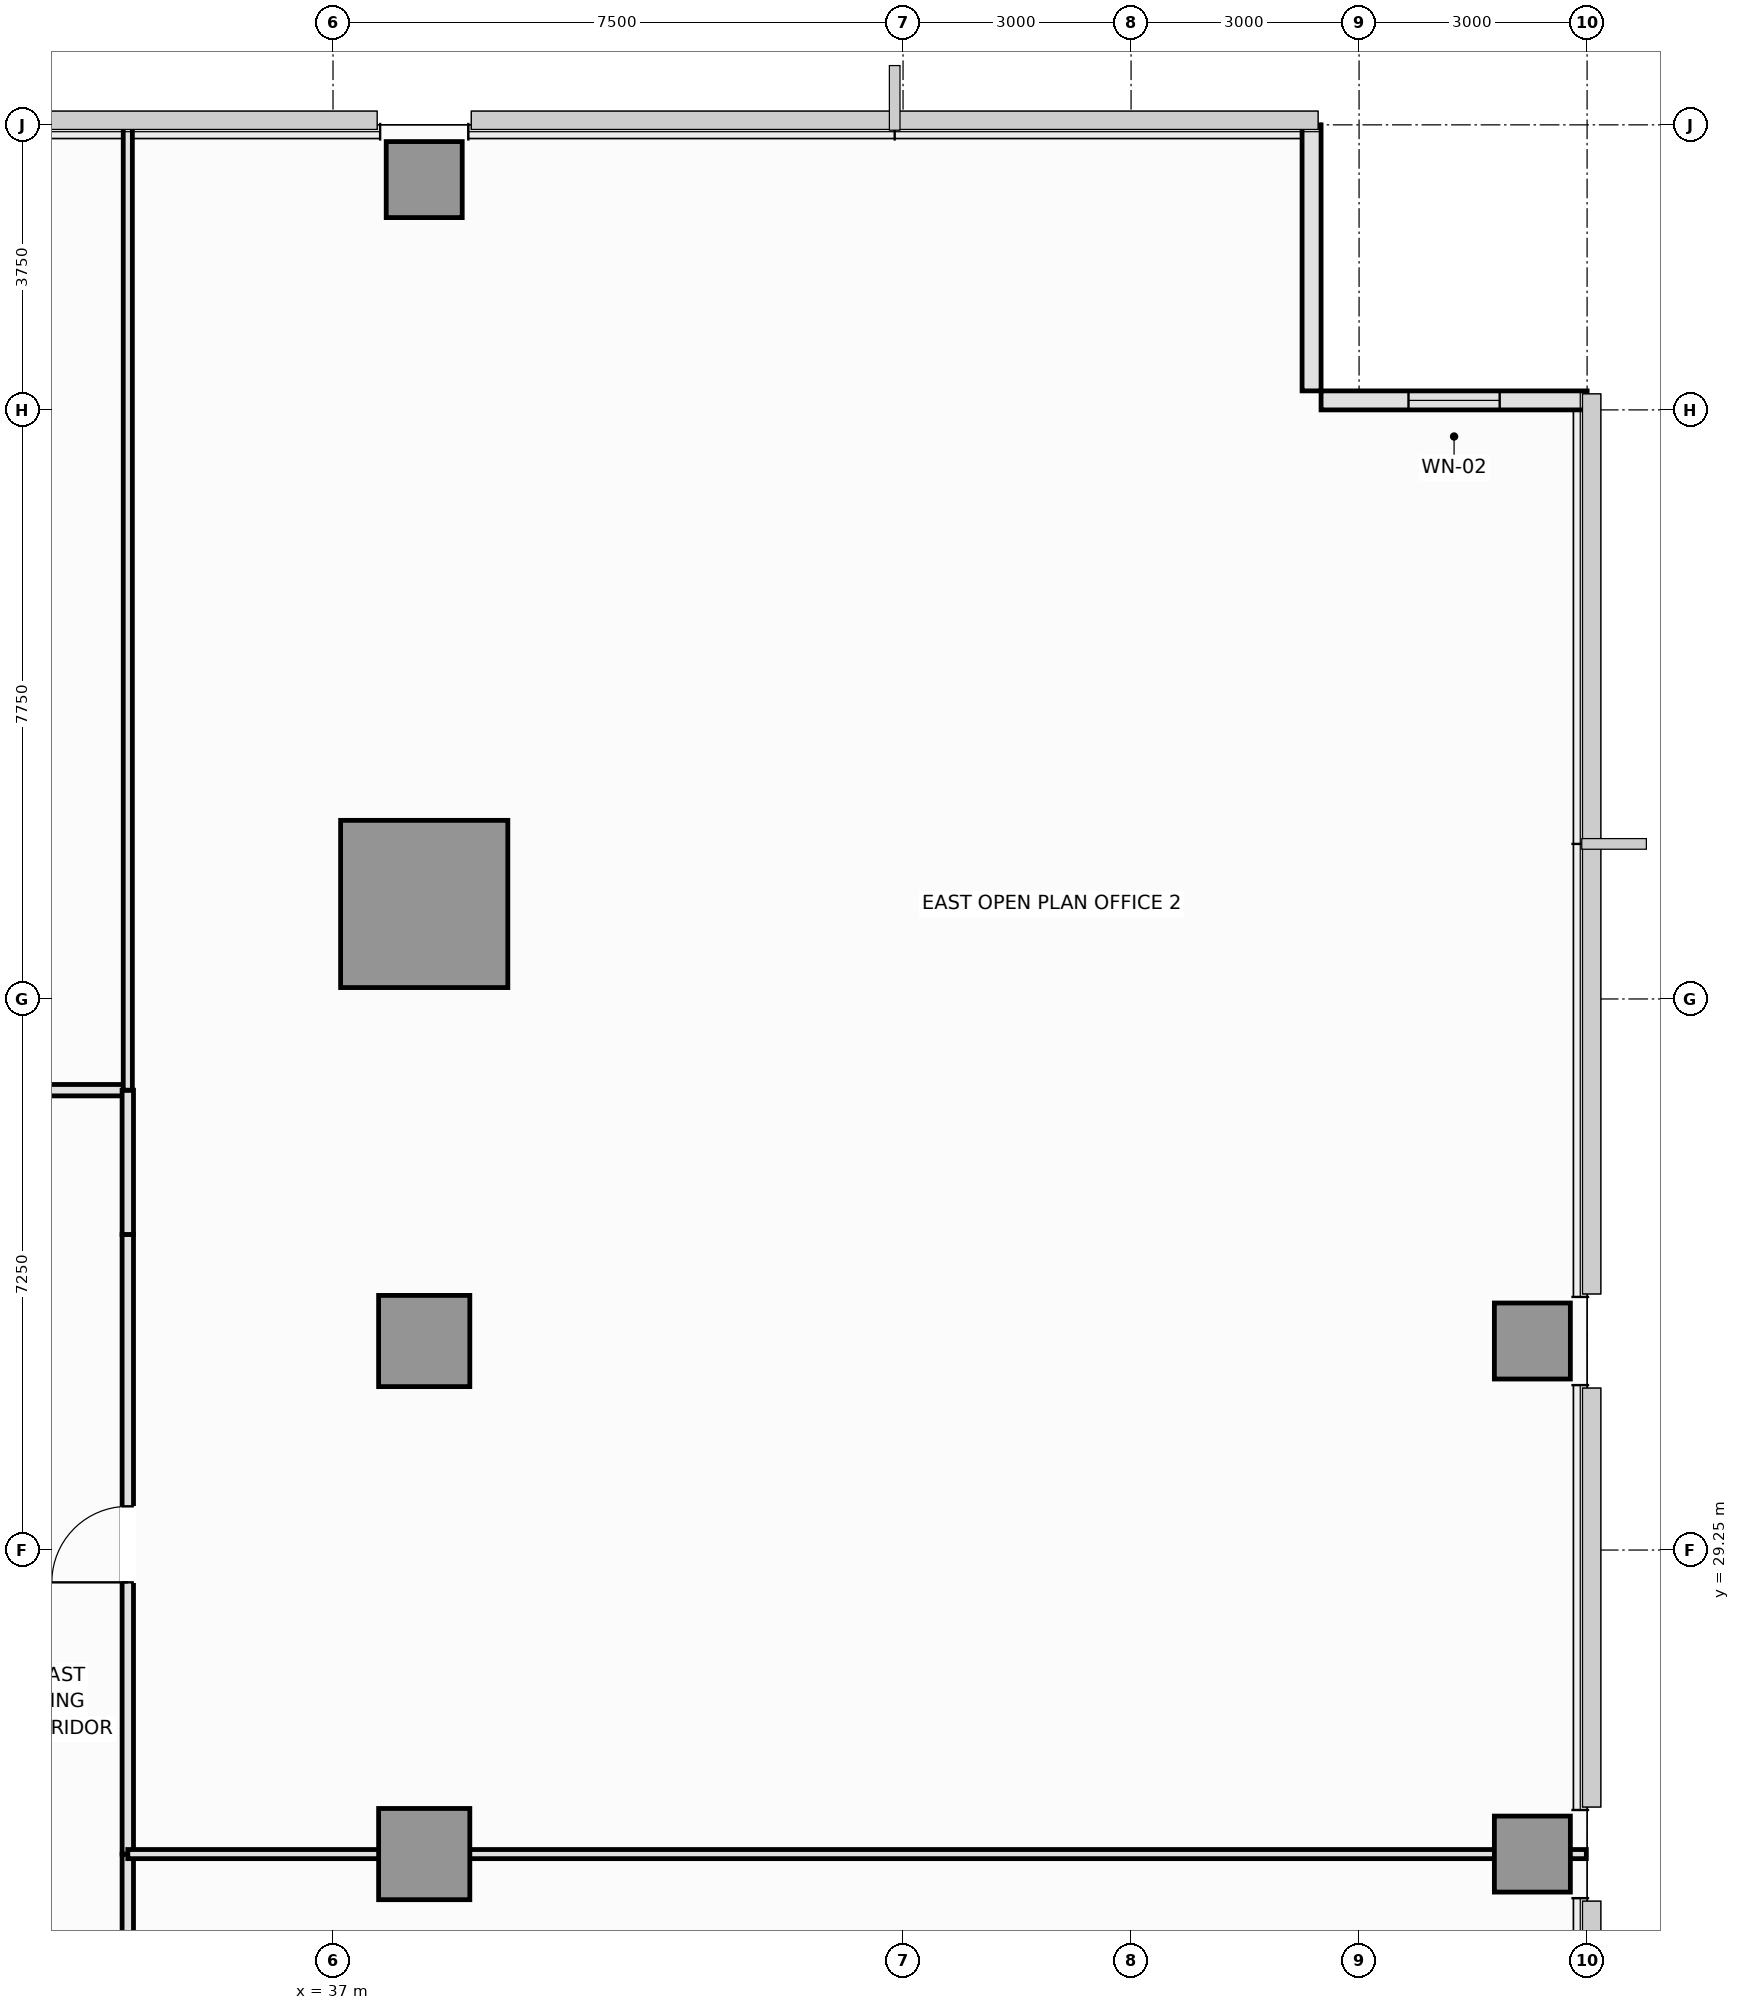
"""IFC4 building model, lengths in metres.
Left out: names, types, materials, properties, quantities, classifications, styles, units other than length and angle.
Written with IfcOpenShell. Run it as: python <this file> out.ifc"""

import sys

from ifc_helpers import new_model, si_unit, direction, frame, frame_2d, origin, origin_2d, place, context, subcontext, project, spatial, rectangle, extrude, element, fill, save


model = new_model("IFC4")
c1 = context("Model", 3, precision=1e-05, world=origin(), true_north=direction((0.0, 1.0)))
c2 = subcontext(c1, "Body", "Model", "MODEL_VIEW")
j1 = project(units=[si_unit("LENGTHUNIT", "METRE"), si_unit("PLANEANGLEUNIT", "RADIAN")], contexts=[c1])
p1 = place(None, origin())
s1 = spatial("IfcSite", under=j1, at=p1, CompositionType="ELEMENT")
p2 = place(p1, origin())
s2 = spatial("IfcBuilding", under=s1, at=p2, CompositionType="ELEMENT")
p3 = place(p2, frame((0.0, 0.0, 36.25)))
s3 = spatial("IfcBuildingStorey", under=s2, at=p3, CompositionType="ELEMENT", Elevation=36.25)
p4 = place(p3, frame((38.2, 37.75, 0.0), z_axis=(0.0, 0.0, 1.0), x_axis=(1.0, 0.0, 0.0)))
e1 = element("IfcColumn", 1, at=p4, inside=s3, PredefinedType="COLUMN", context=c2, shape_type="SweptSolid", body=[
    extrude(rectangle(XDim=2.2, YDim=2.2, at=origin_2d()), origin(), (0.0, 0.0, 1.0), 3.55),
])
for number, where, z_axis, x_axis in (
    (2, (38.2, 25.25, 0.0), (0.0, 0.0, 1.0), (1.0, 0.0, 0.0)),
    (3, (38.2, 32.0, 0.0), (0.0, 0.0, 1.0), (1.0, 0.0, 0.0)),
):
    element("IfcColumn", number, at=place(p3, frame(where, z_axis=z_axis, x_axis=x_axis)), inside=s3, PredefinedType="COLUMN", context=c2, shape_type="SweptSolid", body=[
        extrude(rectangle(XDim=1.2, YDim=1.2, at=origin_2d()), origin(), (0.0, 0.0, 1.0), 3.55),
    ])
for number, where, z_axis, x_axis in (
    (4, (52.78, 25.25, 0.0), (0.0, 0.0, 1.0), (1.0, 0.0, 0.0)),
    (5, (52.78, 32.0, 0.0), (0.0, 0.0, 1.0), (1.0, 0.0, 0.0)),
    (6, (38.2, 47.28, 0.0), (0.0, 0.0, 1.0), (1.0, 0.0, 0.0)),
):
    element("IfcColumn", number, at=place(p3, frame(where, z_axis=z_axis, x_axis=x_axis)), inside=s3, PredefinedType="COLUMN", context=c2, shape_type="SweptSolid", body=[
        extrude(rectangle(XDim=1.0, YDim=1.0, at=origin_2d()), origin(), (0.0, 0.0, 1.0), 3.55),
    ])
p5 = place(p3, frame((53.5, 44.375, 0.0), z_axis=(0.0, 0.0, 1.0), x_axis=(-1.0, 0.0, 0.0)))
e7 = element("IfcWall", 7, at=p5, inside=s3, PredefinedType="SOLIDWALL", context=c2, shape_type="SweptSolid", body=[
    extrude(rectangle(XDim=3.5, YDim=0.25, at=frame_2d((1.75, 0.0))), origin(), (0.0, 0.0, 1.0), 3.37),
])
p6 = place(p5, frame((1.15, 0.0, 0.9)))
e8 = element("IfcOpeningElement", 8, at=p6, cuts=e7, PredefinedType="OPENING", context=c2, shape_type="SweptSolid", body=[
    extrude(rectangle(XDim=1.2, YDim=1.8, at=frame_2d((0.6, 0.9))), frame((0.0, 0.135, 0.0), z_axis=(0.0, -1.0, 0.0), x_axis=(1.0, 0.0, 0.0)), (0.0, 0.0, 1.0), 0.27),
])
p7 = place(p3, frame((49.875, 44.5, 0.0), z_axis=(0.0, 0.0, 1.0), x_axis=(0.0, 1.0, 0.0)))
e9 = element("IfcWall", 9, at=p7, inside=s3, PredefinedType="SOLIDWALL", context=c2, shape_type="SweptSolid", body=[
    extrude(rectangle(XDim=3.5, YDim=0.25, at=frame_2d((1.75, 0.0))), origin(), (0.0, 0.0, 1.0), 3.37),
])
p8 = place(p3, frame((27.5, 35.3, 0.0), z_axis=(0.0, 0.0, 1.0), x_axis=(1.0, 0.0, 0.0)))
e10 = element("IfcWall", 10, at=p8, inside=s3, PredefinedType="PARTITIONING", context=c2, shape_type="SweptSolid", body=[
    extrude(rectangle(XDim=6.8, YDim=0.15, at=frame_2d((3.4, 0.0))), origin(), (0.0, 0.0, 1.0), 3.37),
])
p9 = place(p8, frame((2.9, 0.0, 0.0)))
e11 = element("IfcOpeningElement", 11, at=p9, cuts=e10, PredefinedType="OPENING", context=c2, shape_type="SweptSolid", body=[
    extrude(rectangle(XDim=1.0, YDim=2.15, at=frame_2d((0.5, 1.075))), frame((0.0, 0.085, 0.0), z_axis=(0.0, -1.0, 0.0), x_axis=(1.0, 0.0, 0.0)), (0.0, 0.0, 1.0), 0.17),
])
p10 = place(p3, frame((34.3, 33.4, 0.0), z_axis=(0.0, 0.0, 1.0), x_axis=(0.0, 1.0, 0.0)))
e12 = element("IfcWall", 12, at=p10, inside=s3, PredefinedType="PARTITIONING", context=c2, shape_type="SweptSolid", body=[
    extrude(rectangle(XDim=1.9, YDim=0.15, at=frame_2d((0.95, 0.0))), origin(), (0.0, 0.0, 1.0), 3.37),
])
p11 = place(p3, frame((34.3, 17.1, 0.0), z_axis=(0.0, 0.0, 1.0), x_axis=(0.0, 1.0, 0.0)))
e13 = element("IfcWall", 13, at=p11, inside=s3, PredefinedType="PARTITIONING", context=c2, shape_type="SweptSolid", body=[
    extrude(rectangle(XDim=8.15, YDim=0.15, at=frame_2d((4.075, 0.0))), origin(), (0.0, 0.0, 1.0), 3.37),
])
p12 = place(p11, frame((3.575, 0.0, 0.0)))
e14 = element("IfcOpeningElement", 14, at=p12, cuts=e13, PredefinedType="OPENING", context=c2, shape_type="SweptSolid", body=[
    extrude(rectangle(XDim=1.0, YDim=2.15, at=frame_2d((0.5, 1.075))), frame((0.0, 0.085, 0.0), z_axis=(0.0, -1.0, 0.0), x_axis=(1.0, 0.0, 0.0)), (0.0, 0.0, 1.0), 0.17),
])
p13 = place(p3, frame((34.3, 25.25, 0.0), z_axis=(0.0, 0.0, 1.0), x_axis=(0.0, 1.0, 0.0)))
e15 = element("IfcWall", 15, at=p13, inside=s3, PredefinedType="PARTITIONING", context=c2, shape_type="SweptSolid", body=[
    extrude(rectangle(XDim=8.15, YDim=0.15, at=frame_2d((4.075, 0.0))), origin(), (0.0, 0.0, 1.0), 3.37),
])
p14 = place(p13, frame((3.575, 0.0, 0.0)))
e16 = element("IfcOpeningElement", 16, at=p14, cuts=e15, PredefinedType="OPENING", context=c2, shape_type="SweptSolid", body=[
    extrude(rectangle(XDim=1.0, YDim=2.15, at=frame_2d((0.5, 1.075))), frame((0.0, 0.085, 0.0), z_axis=(0.0, -1.0, 0.0), x_axis=(1.0, 0.0, 0.0)), (0.0, 0.0, 1.0), 0.17),
])
p15 = place(p3, frame((34.3, 35.3, 0.0), z_axis=(0.0, 0.0, 1.0), x_axis=(0.0, 1.0, 0.0)))
e17 = element("IfcWall", 17, at=p15, inside=s3, PredefinedType="PARTITIONING", context=c2, shape_type="SweptSolid", body=[
    extrude(rectangle(XDim=12.69, YDim=0.12, at=frame_2d((6.345, 0.0))), origin(), (0.0, 0.0, 1.0), 3.37),
])
p16 = place(p3, frame((34.3, 25.25, 0.0), z_axis=(0.0, 0.0, 1.0), x_axis=(1.0, 0.0, 0.0)))
e18 = element("IfcWall", 18, at=p16, inside=s3, PredefinedType="PARTITIONING", context=c2, shape_type="SweptSolid", body=[
    extrude(rectangle(XDim=19.19, YDim=0.12, at=frame_2d((9.595, 0.0))), origin(), (0.0, 0.0, 1.0), 2.72),
])
p17 = place(p6, origin())
e19 = element("IfcWindow", 19, at=p17, inside=s3, PartitioningType="SINGLE_PANEL", PredefinedType="WINDOW", context=c2, shape_type="SweptSolid", body=[
    extrude(rectangle(XDim=1.2, YDim=1.8, at=frame_2d((0.6, 0.9))), frame((0.0, 0.03, 0.0), z_axis=(0.0, -1.0, 0.0), x_axis=(1.0, 0.0, 0.0)), (0.0, 0.0, 1.0), 0.06),
])
fill(e8, e19)
p18 = place(p14, origin())
e20 = element("IfcDoor", 20, at=p18, inside=s3, OperationType="SINGLE_SWING_LEFT", PredefinedType="DOOR", context=c2, shape_type="SweptSolid", body=[
    extrude(rectangle(XDim=1.0, YDim=2.15, at=frame_2d((0.5, 1.075))), frame((0.0, 0.025, 0.0), z_axis=(0.0, -1.0, 0.0), x_axis=(1.0, 0.0, 0.0)), (0.0, 0.0, 1.0), 0.05),
])
fill(e16, e20)
save(model, sys.argv[1])
